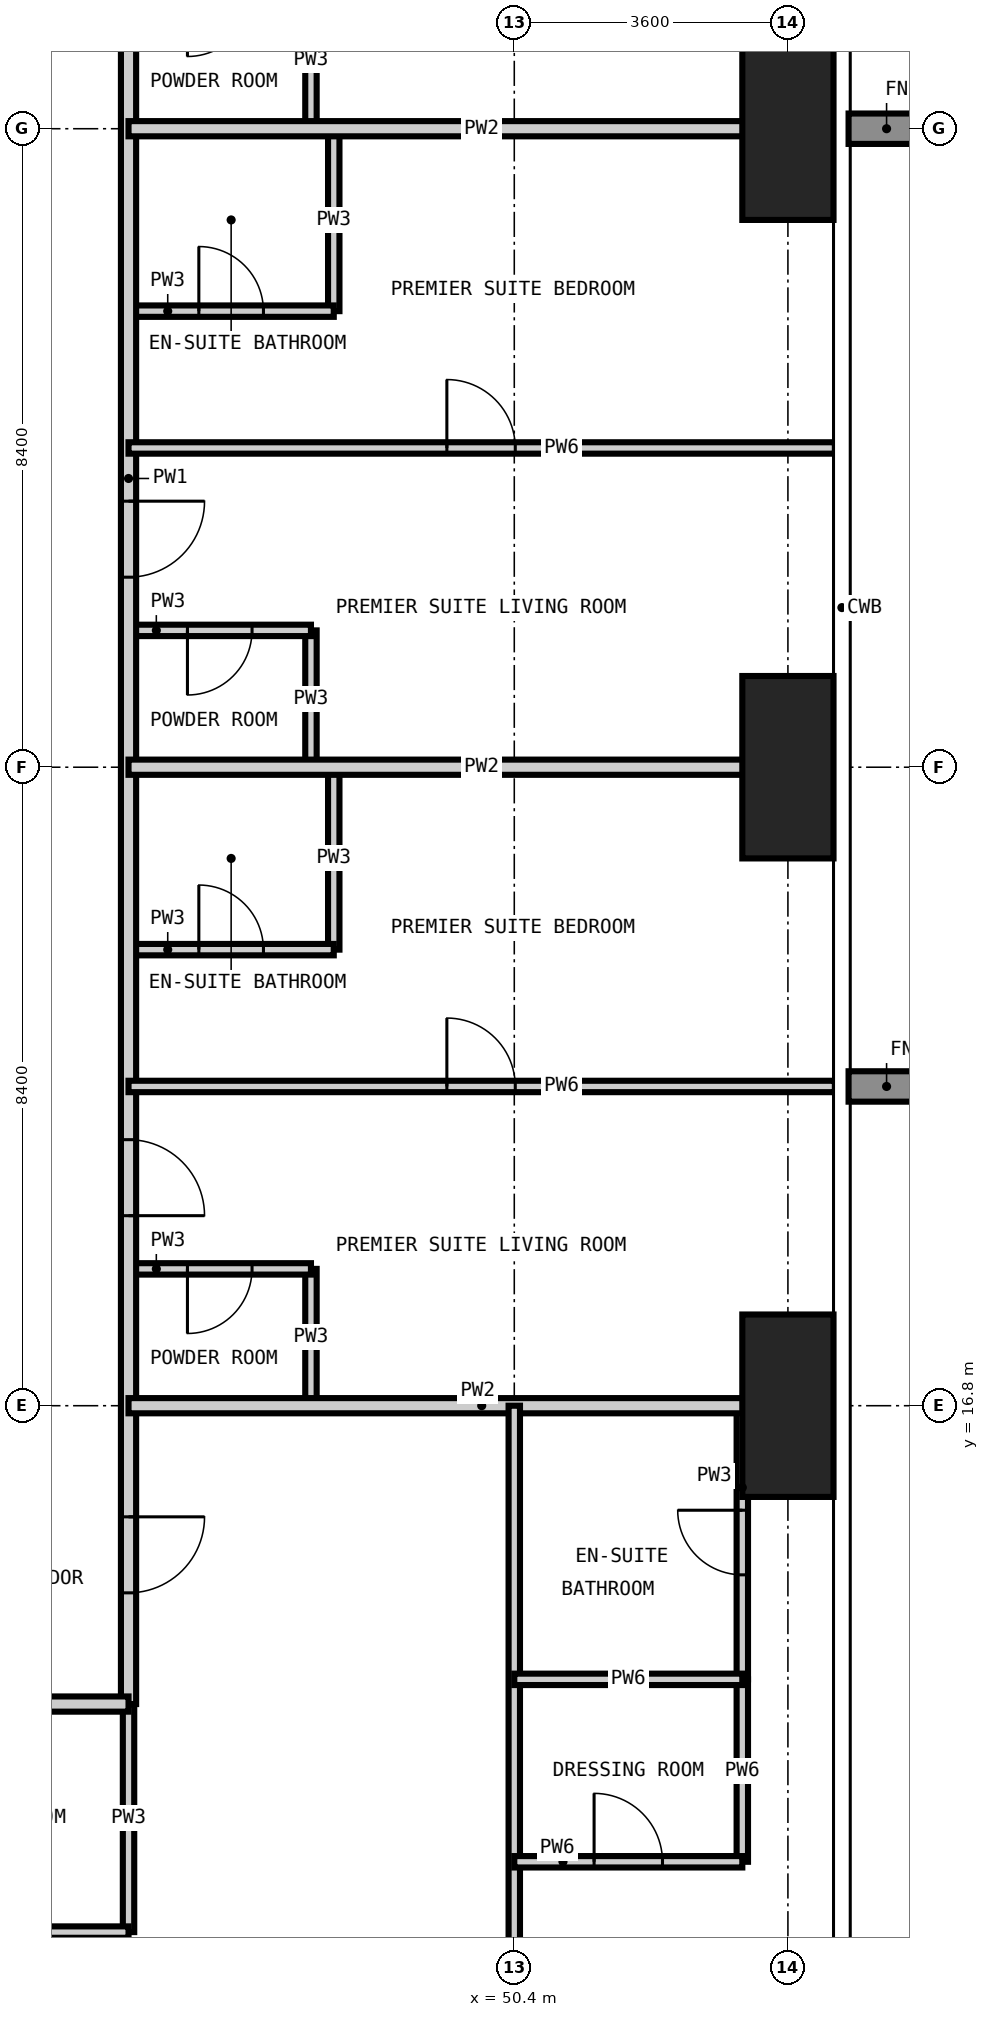
"""IFC4 building model, lengths in metres.
Left out: names, types, materials, properties, quantities, classifications, styles, units other than length and angle.
Written with IfcOpenShell. Run it as: python <this file> out.ifc"""

import sys

from ifc_helpers import new_model, si_unit, direction, frame, frame_2d, origin, origin_2d, place, context, subcontext, project, spatial, rectangle, extrude, element, fill, save


model = new_model("IFC4")
c1 = context("Model", 3, precision=1e-05, world=origin(), true_north=direction((0.0, 1.0)))
c2 = subcontext(c1, "Body", "Model", "MODEL_VIEW")
j1 = project(units=[si_unit("LENGTHUNIT", "METRE"), si_unit("PLANEANGLEUNIT", "RADIAN")], contexts=[c1])
p1 = place(None, origin())
s1 = spatial("IfcSite", under=j1, at=p1, CompositionType="ELEMENT")
p2 = place(p1, origin())
s2 = spatial("IfcBuilding", under=s1, at=p2, CompositionType="ELEMENT")
p3 = place(p2, frame((0.0, 0.0, 111.6)))
s3 = spatial("IfcBuildingStorey", under=s2, at=p3, CompositionType="ELEMENT", Elevation=111.6)
for number, where, z_axis, x_axis in (
    (1, (54.0, 16.8, -0.35), (0.0, 0.0, 1.0), (1.0, 0.0, 0.0)),
    (2, (54.0, 25.2, -0.35), (0.0, 0.0, 1.0), (1.0, 0.0, 0.0)),
    (3, (54.0, 33.6, -0.35), (0.0, 0.0, 1.0), (1.0, 0.0, 0.0)),
):
    element("IfcColumn", number, at=place(p3, frame(where, z_axis=z_axis, x_axis=x_axis)), inside=s3, PredefinedType="COLUMN", context=c2, shape_type="SweptSolid", body=[
        extrude(rectangle(XDim=1.2, YDim=2.4, at=origin_2d()), origin(), (0.0, 0.0, 1.0), 3.6),
    ])
p4 = place(p3, frame((45.325, 9.875, 0.0), z_axis=(0.0, 0.0, 1.0), x_axis=(0.0, 1.0, 0.0)))
e4 = element("IfcWall", 4, at=p4, inside=s3, PredefinedType="PARTITIONING", context=c2, shape_type="SweptSolid", body=[
    extrude(rectangle(XDim=3.0, YDim=0.15, at=frame_2d((1.5, 0.0))), origin(), (0.0, 0.0, 1.0), 3.25),
])
for number, where, z_axis, x_axis in (
    (5, (47.725, 16.8, 0.0), (0.0, 0.0, 1.0), (0.0, 1.0, 0.0)),
    (6, (47.725, 25.2, 0.0), (0.0, 0.0, 1.0), (0.0, 1.0, 0.0)),
):
    element("IfcWall", number, at=place(p3, frame(where, z_axis=z_axis, x_axis=x_axis)), inside=s3, PredefinedType="PARTITIONING", context=c2, shape_type="SweptSolid", body=[
        extrude(rectangle(XDim=1.8, YDim=0.15, at=frame_2d((0.9, 0.0))), origin(), (0.0, 0.0, 1.0), 3.25),
    ])
p5 = place(p3, frame((47.725, 33.6, 0.0), z_axis=(0.0, 0.0, 1.0), x_axis=(0.0, 1.0, 0.0)))
e7 = element("IfcWall", 7, at=p5, inside=s3, PredefinedType="PARTITIONING", context=c2, shape_type="SweptSolid", body=[
    extrude(rectangle(XDim=1.8, YDim=0.15, at=frame_2d((0.9, 0.0))), origin(), (0.0, 0.0, 1.0), 3.25),
])
p6 = place(p3, frame((48.025, 22.8, 0.0), z_axis=(0.0, 0.0, 1.0), x_axis=(0.0, 1.0, 0.0)))
e8 = element("IfcWall", 8, at=p6, inside=s3, PredefinedType="PARTITIONING", context=c2, shape_type="SweptSolid", body=[
    extrude(rectangle(XDim=2.4, YDim=0.15, at=frame_2d((1.2, 0.0))), origin(), (0.0, 0.0, 1.0), 3.25),
])
p7 = place(p3, frame((48.025, 31.2, 0.0), z_axis=(0.0, 0.0, 1.0), x_axis=(0.0, 1.0, 0.0)))
e9 = element("IfcWall", 9, at=p7, inside=s3, PredefinedType="PARTITIONING", context=c2, shape_type="SweptSolid", body=[
    extrude(rectangle(XDim=2.4, YDim=0.15, at=frame_2d((1.2, 0.0))), origin(), (0.0, 0.0, 1.0), 3.25),
])
p8 = place(p3, frame((53.4, 13.2, 0.0), z_axis=(0.0, 0.0, 1.0), x_axis=(0.0, 1.0, 0.0)))
e10 = element("IfcWall", 10, at=p8, inside=s3, PredefinedType="PARTITIONING", context=c2, shape_type="SweptSolid", body=[
    extrude(rectangle(XDim=3.6, YDim=0.15, at=frame_2d((1.8, 0.0))), origin(), (0.0, 0.0, 1.0), 3.25),
])
p9 = place(p8, frame((1.375, 0.0, 0.0)))
e11 = element("IfcOpeningElement", 11, at=p9, cuts=e10, PredefinedType="OPENING", context=c2, shape_type="SweptSolid", body=[
    extrude(rectangle(XDim=0.85, YDim=2.1, at=frame_2d((0.425, 1.05))), frame((0.0, 0.085, 0.0), z_axis=(0.0, -1.0, 0.0), x_axis=(1.0, 0.0, 0.0)), (0.0, 0.0, 1.0), 0.17),
])
p10 = place(p3, frame((42.0, 9.875, 0.0), z_axis=(0.0, 0.0, 1.0), x_axis=(1.0, 0.0, 0.0)))
e12 = element("IfcWall", 12, at=p10, inside=s3, PredefinedType="PARTITIONING", context=c2, shape_type="SweptSolid", body=[
    extrude(rectangle(XDim=3.325, YDim=0.15, at=frame_2d((1.663, 0.0))), origin(), (0.0, 0.0, 1.0), 3.25),
])
p11 = place(p10, frame((1.238, 0.0, 0.0)))
e13 = element("IfcOpeningElement", 13, at=p11, cuts=e12, PredefinedType="OPENING", context=c2, shape_type="SweptSolid", body=[
    extrude(rectangle(XDim=0.85, YDim=2.1, at=frame_2d((0.425, 1.05))), frame((0.0, 0.085, 0.0), z_axis=(0.0, -1.0, 0.0), x_axis=(1.0, 0.0, 0.0)), (0.0, 0.0, 1.0), 0.17),
])
p12 = place(p3, frame((45.325, 18.6, 0.0), z_axis=(0.0, 0.0, 1.0), x_axis=(1.0, 0.0, 0.0)))
e14 = element("IfcWall", 14, at=p12, inside=s3, PredefinedType="PARTITIONING", context=c2, shape_type="SweptSolid", body=[
    extrude(rectangle(XDim=2.4, YDim=0.15, at=frame_2d((1.2, 0.0))), origin(), (0.0, 0.0, 1.0), 3.25),
])
p13 = place(p12, frame((0.775, 0.0, 0.0)))
e15 = element("IfcOpeningElement", 15, at=p13, cuts=e14, PredefinedType="OPENING", context=c2, shape_type="SweptSolid", body=[
    extrude(rectangle(XDim=0.85, YDim=2.1, at=frame_2d((0.425, 1.05))), frame((0.0, 0.085, 0.0), z_axis=(0.0, -1.0, 0.0), x_axis=(1.0, 0.0, 0.0)), (0.0, 0.0, 1.0), 0.17),
])
p14 = place(p3, frame((45.325, 22.8, 0.0), z_axis=(0.0, 0.0, 1.0), x_axis=(1.0, 0.0, 0.0)))
e16 = element("IfcWall", 16, at=p14, inside=s3, PredefinedType="PARTITIONING", context=c2, shape_type="SweptSolid", body=[
    extrude(rectangle(XDim=2.7, YDim=0.15, at=frame_2d((1.35, 0.0))), origin(), (0.0, 0.0, 1.0), 3.25),
])
p15 = place(p14, frame((0.925, 0.0, 0.0)))
e17 = element("IfcOpeningElement", 17, at=p15, cuts=e16, PredefinedType="OPENING", context=c2, shape_type="SweptSolid", body=[
    extrude(rectangle(XDim=0.85, YDim=2.1, at=frame_2d((0.425, 1.05))), frame((0.0, 0.085, 0.0), z_axis=(0.0, -1.0, 0.0), x_axis=(1.0, 0.0, 0.0)), (0.0, 0.0, 1.0), 0.17),
])
p16 = place(p3, frame((45.325, 27.0, 0.0), z_axis=(0.0, 0.0, 1.0), x_axis=(1.0, 0.0, 0.0)))
e18 = element("IfcWall", 18, at=p16, inside=s3, PredefinedType="PARTITIONING", context=c2, shape_type="SweptSolid", body=[
    extrude(rectangle(XDim=2.4, YDim=0.15, at=frame_2d((1.2, 0.0))), origin(), (0.0, 0.0, 1.0), 3.25),
])
p17 = place(p16, frame((0.775, 0.0, 0.0)))
e19 = element("IfcOpeningElement", 19, at=p17, cuts=e18, PredefinedType="OPENING", context=c2, shape_type="SweptSolid", body=[
    extrude(rectangle(XDim=0.85, YDim=2.1, at=frame_2d((0.425, 1.05))), frame((0.0, 0.085, 0.0), z_axis=(0.0, -1.0, 0.0), x_axis=(1.0, 0.0, 0.0)), (0.0, 0.0, 1.0), 0.17),
])
p18 = place(p3, frame((45.325, 31.2, 0.0), z_axis=(0.0, 0.0, 1.0), x_axis=(1.0, 0.0, 0.0)))
e20 = element("IfcWall", 20, at=p18, inside=s3, PredefinedType="PARTITIONING", context=c2, shape_type="SweptSolid", body=[
    extrude(rectangle(XDim=2.7, YDim=0.15, at=frame_2d((1.35, 0.0))), origin(), (0.0, 0.0, 1.0), 3.25),
])
p19 = place(p18, frame((0.925, 0.0, 0.0)))
e21 = element("IfcOpeningElement", 21, at=p19, cuts=e20, PredefinedType="OPENING", context=c2, shape_type="SweptSolid", body=[
    extrude(rectangle(XDim=0.85, YDim=2.1, at=frame_2d((0.425, 1.05))), frame((0.0, 0.085, 0.0), z_axis=(0.0, -1.0, 0.0), x_axis=(1.0, 0.0, 0.0)), (0.0, 0.0, 1.0), 0.17),
])
p20 = place(p3, frame((45.325, 44.725, 0.0), z_axis=(0.0, 0.0, 1.0), x_axis=(0.0, -1.0, 0.0)))
e22 = element("IfcWall", 22, at=p20, inside=s3, PredefinedType="PARTITIONING", context=c2, shape_type="SweptSolid", body=[
    extrude(rectangle(XDim=31.85, YDim=0.2, at=frame_2d((15.925, 0.0))), origin(), (0.0, 0.0, 1.0), 3.25),
])
p21 = place(p20, frame((24.425, 0.0, 0.0)))
e23 = element("IfcOpeningElement", 23, at=p21, cuts=e22, PredefinedType="OPENING", context=c2, shape_type="SweptSolid", body=[
    extrude(rectangle(XDim=1.0, YDim=2.2, at=frame_2d((0.5, 1.1))), frame((0.0, 0.11, 0.0), z_axis=(0.0, -1.0, 0.0), x_axis=(1.0, 0.0, 0.0)), (0.0, 0.0, 1.0), 0.22),
])
p22 = place(p20, frame((16.025, 0.0, 0.0)))
e24 = element("IfcOpeningElement", 24, at=p22, cuts=e22, PredefinedType="OPENING", context=c2, shape_type="SweptSolid", body=[
    extrude(rectangle(XDim=1.0, YDim=2.2, at=frame_2d((0.5, 1.1))), frame((0.0, 0.11, 0.0), z_axis=(0.0, -1.0, 0.0), x_axis=(1.0, 0.0, 0.0)), (0.0, 0.0, 1.0), 0.22),
])
p23 = place(p20, frame((7.625, 0.0, 0.0)))
e25 = element("IfcOpeningElement", 25, at=p23, cuts=e22, PredefinedType="OPENING", context=c2, shape_type="SweptSolid", body=[
    extrude(rectangle(XDim=1.0, YDim=2.2, at=frame_2d((0.5, 1.1))), frame((0.0, 0.11, 0.0), z_axis=(0.0, -1.0, 0.0), x_axis=(1.0, 0.0, 0.0)), (0.0, 0.0, 1.0), 0.22),
])
p24 = place(p20, frame((29.387, 0.0, 0.0)))
e26 = element("IfcOpeningElement", 26, at=p24, cuts=e22, PredefinedType="OPENING", context=c2, shape_type="SweptSolid", body=[
    extrude(rectangle(XDim=1.0, YDim=2.2, at=frame_2d((0.5, 1.1))), frame((0.0, 0.11, 0.0), z_axis=(0.0, -1.0, 0.0), x_axis=(1.0, 0.0, 0.0)), (0.0, 0.0, 1.0), 0.22),
])
p25 = place(p20, frame((0.863, 0.0, 0.0)))
e27 = element("IfcOpeningElement", 27, at=p25, cuts=e22, PredefinedType="OPENING", context=c2, shape_type="SweptSolid", body=[
    extrude(rectangle(XDim=1.0, YDim=2.2, at=frame_2d((0.5, 1.1))), frame((0.0, 0.11, 0.0), z_axis=(0.0, -1.0, 0.0), x_axis=(1.0, 0.0, 0.0)), (0.0, 0.0, 1.0), 0.22),
])
p26 = place(p3, frame((45.325, 12.875, 0.0), z_axis=(0.0, 0.0, 1.0), x_axis=(-1.0, 0.0, 0.0)))
e28 = element("IfcWall", 28, at=p26, inside=s3, PredefinedType="PARTITIONING", context=c2, shape_type="SweptSolid", body=[
    extrude(rectangle(XDim=32.725, YDim=0.2, at=frame_2d((16.362, 0.0))), origin(), (0.0, 0.0, 1.0), 3.25),
])
p27 = place(p26, frame((22.625, 0.0, 0.0)))
e29 = element("IfcOpeningElement", 29, at=p27, cuts=e28, PredefinedType="OPENING", context=c2, shape_type="SweptSolid", body=[
    extrude(rectangle(XDim=1.0, YDim=2.2, at=frame_2d((0.5, 1.1))), frame((0.0, 0.11, 0.0), z_axis=(0.0, -1.0, 0.0), x_axis=(1.0, 0.0, 0.0)), (0.0, 0.0, 1.0), 0.22),
])
p28 = place(p26, frame((14.225, 0.0, 0.0)))
e30 = element("IfcOpeningElement", 30, at=p28, cuts=e28, PredefinedType="OPENING", context=c2, shape_type="SweptSolid", body=[
    extrude(rectangle(XDim=1.0, YDim=2.2, at=frame_2d((0.5, 1.1))), frame((0.0, 0.11, 0.0), z_axis=(0.0, -1.0, 0.0), x_axis=(1.0, 0.0, 0.0)), (0.0, 0.0, 1.0), 0.22),
])
p29 = place(p26, frame((5.825, 0.0, 0.0)))
e31 = element("IfcOpeningElement", 31, at=p29, cuts=e28, PredefinedType="OPENING", context=c2, shape_type="SweptSolid", body=[
    extrude(rectangle(XDim=1.0, YDim=2.2, at=frame_2d((0.5, 1.1))), frame((0.0, 0.11, 0.0), z_axis=(0.0, -1.0, 0.0), x_axis=(1.0, 0.0, 0.0)), (0.0, 0.0, 1.0), 0.22),
])
for number, where, z_axis, x_axis in (
    (32, (45.325, 16.8, 0.0), (0.0, 0.0, 1.0), (1.0, 0.0, 0.0)),
    (33, (45.325, 25.2, 0.0), (0.0, 0.0, 1.0), (1.0, 0.0, 0.0)),
    (34, (45.325, 33.6, 0.0), (0.0, 0.0, 1.0), (1.0, 0.0, 0.0)),
):
    element("IfcWall", number, at=place(p3, frame(where, z_axis=z_axis, x_axis=x_axis)), inside=s3, PredefinedType="PARTITIONING", context=c2, shape_type="SweptSolid", body=[
        extrude(rectangle(XDim=9.293, YDim=0.2, at=frame_2d((4.646, 0.0))), origin(), (0.0, 0.0, 1.0), 3.25),
    ])
p30 = place(p3, frame((50.4, -0.018, 0.0), z_axis=(0.0, 0.0, 1.0), x_axis=(0.0, 1.0, 0.0)))
e35 = element("IfcWall", 35, at=p30, inside=s3, PredefinedType="PARTITIONING", context=c2, shape_type="SweptSolid", body=[
    extrude(rectangle(XDim=16.818, YDim=0.15, at=frame_2d((8.409, 0.0))), origin(), (0.0, 0.0, 1.0), 3.25),
])
p31 = place(p30, frame((5.668, 0.0, 0.0)))
e36 = element("IfcOpeningElement", 36, at=p31, cuts=e35, PredefinedType="OPENING", context=c2, shape_type="SweptSolid", body=[
    extrude(rectangle(XDim=0.9, YDim=2.1, at=frame_2d((0.45, 1.05))), frame((0.0, 0.085, 0.0), z_axis=(0.0, -1.0, 0.0), x_axis=(1.0, 0.0, 0.0)), (0.0, 0.0, 1.0), 0.17),
])
p32 = place(p3, frame((53.4, 10.8, 0.0), z_axis=(0.0, 0.0, 1.0), x_axis=(0.0, 1.0, 0.0)))
e37 = element("IfcWall", 37, at=p32, inside=s3, PredefinedType="PARTITIONING", context=c2, shape_type="SweptSolid", body=[
    extrude(rectangle(XDim=2.4, YDim=0.15, at=frame_2d((1.2, 0.0))), origin(), (0.0, 0.0, 1.0), 3.25),
])
p33 = place(p3, frame((50.4, 10.8, 0.0), z_axis=(0.0, 0.0, 1.0), x_axis=(1.0, 0.0, 0.0)))
e38 = element("IfcWall", 38, at=p33, inside=s3, PredefinedType="PARTITIONING", context=c2, shape_type="SweptSolid", body=[
    extrude(rectangle(XDim=3.0, YDim=0.15, at=frame_2d((1.5, 0.0))), origin(), (0.0, 0.0, 1.0), 3.25),
])
p34 = place(p33, frame((1.05, 0.0, 0.0)))
e39 = element("IfcOpeningElement", 39, at=p34, cuts=e38, PredefinedType="OPENING", context=c2, shape_type="SweptSolid", body=[
    extrude(rectangle(XDim=0.9, YDim=2.1, at=frame_2d((0.45, 1.05))), frame((0.0, 0.085, 0.0), z_axis=(0.0, -1.0, 0.0), x_axis=(1.0, 0.0, 0.0)), (0.0, 0.0, 1.0), 0.17),
])
p35 = place(p3, frame((50.4, 13.2, 0.0), z_axis=(0.0, 0.0, 1.0), x_axis=(1.0, 0.0, 0.0)))
e40 = element("IfcWall", 40, at=p35, inside=s3, PredefinedType="PARTITIONING", context=c2, shape_type="SweptSolid", body=[
    extrude(rectangle(XDim=3.0, YDim=0.15, at=frame_2d((1.5, 0.0))), origin(), (0.0, 0.0, 1.0), 3.25),
])
p36 = place(p3, frame((45.325, 21.0, 0.0), z_axis=(0.0, 0.0, 1.0), x_axis=(1.0, 0.0, 0.0)))
e41 = element("IfcWall", 41, at=p36, inside=s3, PredefinedType="PARTITIONING", context=c2, shape_type="SweptSolid", body=[
    extrude(rectangle(XDim=9.293, YDim=0.15, at=frame_2d((4.646, 0.0))), origin(), (0.0, 0.0, 1.0), 3.25),
])
p37 = place(p36, frame((4.188, 0.0, 0.0)))
e42 = element("IfcOpeningElement", 42, at=p37, cuts=e41, PredefinedType="OPENING", context=c2, shape_type="SweptSolid", body=[
    extrude(rectangle(XDim=0.9, YDim=2.1, at=frame_2d((0.45, 1.05))), frame((0.0, 0.085, 0.0), z_axis=(0.0, -1.0, 0.0), x_axis=(1.0, 0.0, 0.0)), (0.0, 0.0, 1.0), 0.17),
])
p38 = place(p3, frame((45.325, 29.4, 0.0), z_axis=(0.0, 0.0, 1.0), x_axis=(1.0, 0.0, 0.0)))
e43 = element("IfcWall", 43, at=p38, inside=s3, PredefinedType="PARTITIONING", context=c2, shape_type="SweptSolid", body=[
    extrude(rectangle(XDim=9.293, YDim=0.15, at=frame_2d((4.646, 0.0))), origin(), (0.0, 0.0, 1.0), 3.25),
])
p39 = place(p38, frame((4.188, 0.0, 0.0)))
e44 = element("IfcOpeningElement", 44, at=p39, cuts=e43, PredefinedType="OPENING", context=c2, shape_type="SweptSolid", body=[
    extrude(rectangle(XDim=0.9, YDim=2.1, at=frame_2d((0.45, 1.05))), frame((0.0, 0.085, 0.0), z_axis=(0.0, -1.0, 0.0), x_axis=(1.0, 0.0, 0.0)), (0.0, 0.0, 1.0), 0.17),
])
p40 = place(p21, origin())
e45 = element("IfcDoor", 45, at=p40, inside=s3, OperationType="SINGLE_SWING_RIGHT", PredefinedType="DOOR", context=c2, shape_type="SweptSolid", body=[
    extrude(rectangle(XDim=1.0, YDim=2.2, at=frame_2d((0.5, 1.1))), frame((0.0, 0.025, 0.0), z_axis=(0.0, -1.0, 0.0), x_axis=(1.0, 0.0, 0.0)), (0.0, 0.0, 1.0), 0.05),
])
fill(e23, e45)
p41 = place(p13, frame((0.85, 0.0, 0.0), z_axis=(0.0, 0.0, 1.0), x_axis=(-1.0, 0.0, 0.0)))
e46 = element("IfcDoor", 46, at=p41, inside=s3, OperationType="SINGLE_SWING_RIGHT", PredefinedType="DOOR", context=c2, shape_type="SweptSolid", body=[
    extrude(rectangle(XDim=0.85, YDim=2.1, at=frame_2d((0.425, 1.05))), frame((0.0, 0.025, 0.0), z_axis=(0.0, -1.0, 0.0), x_axis=(1.0, 0.0, 0.0)), (0.0, 0.0, 1.0), 0.05),
])
fill(e15, e46)
p42 = place(p37, origin())
e47 = element("IfcDoor", 47, at=p42, inside=s3, OperationType="SINGLE_SWING_LEFT", PredefinedType="DOOR", context=c2, shape_type="SweptSolid", body=[
    extrude(rectangle(XDim=0.9, YDim=2.1, at=frame_2d((0.45, 1.05))), frame((0.0, 0.025, 0.0), z_axis=(0.0, -1.0, 0.0), x_axis=(1.0, 0.0, 0.0)), (0.0, 0.0, 1.0), 0.05),
])
fill(e42, e47)
p43 = place(p15, origin())
e48 = element("IfcDoor", 48, at=p43, inside=s3, OperationType="SINGLE_SWING_LEFT", PredefinedType="DOOR", context=c2, shape_type="SweptSolid", body=[
    extrude(rectangle(XDim=0.85, YDim=2.1, at=frame_2d((0.425, 1.05))), frame((0.0, 0.025, 0.0), z_axis=(0.0, -1.0, 0.0), x_axis=(1.0, 0.0, 0.0)), (0.0, 0.0, 1.0), 0.05),
])
fill(e17, e48)
p44 = place(p22, origin())
e49 = element("IfcDoor", 49, at=p44, inside=s3, OperationType="SINGLE_SWING_LEFT", PredefinedType="DOOR", context=c2, shape_type="SweptSolid", body=[
    extrude(rectangle(XDim=1.0, YDim=2.2, at=frame_2d((0.5, 1.1))), frame((0.0, 0.025, 0.0), z_axis=(0.0, -1.0, 0.0), x_axis=(1.0, 0.0, 0.0)), (0.0, 0.0, 1.0), 0.05),
])
fill(e24, e49)
p45 = place(p17, frame((0.85, 0.0, 0.0), z_axis=(0.0, 0.0, 1.0), x_axis=(-1.0, 0.0, 0.0)))
e50 = element("IfcDoor", 50, at=p45, inside=s3, OperationType="SINGLE_SWING_RIGHT", PredefinedType="DOOR", context=c2, shape_type="SweptSolid", body=[
    extrude(rectangle(XDim=0.85, YDim=2.1, at=frame_2d((0.425, 1.05))), frame((0.0, 0.025, 0.0), z_axis=(0.0, -1.0, 0.0), x_axis=(1.0, 0.0, 0.0)), (0.0, 0.0, 1.0), 0.05),
])
fill(e19, e50)
p46 = place(p39, origin())
e51 = element("IfcDoor", 51, at=p46, inside=s3, OperationType="SINGLE_SWING_LEFT", PredefinedType="DOOR", context=c2, shape_type="SweptSolid", body=[
    extrude(rectangle(XDim=0.9, YDim=2.1, at=frame_2d((0.45, 1.05))), frame((0.0, 0.025, 0.0), z_axis=(0.0, -1.0, 0.0), x_axis=(1.0, 0.0, 0.0)), (0.0, 0.0, 1.0), 0.05),
])
fill(e44, e51)
p47 = place(p19, origin())
e52 = element("IfcDoor", 52, at=p47, inside=s3, OperationType="SINGLE_SWING_LEFT", PredefinedType="DOOR", context=c2, shape_type="SweptSolid", body=[
    extrude(rectangle(XDim=0.85, YDim=2.1, at=frame_2d((0.425, 1.05))), frame((0.0, 0.025, 0.0), z_axis=(0.0, -1.0, 0.0), x_axis=(1.0, 0.0, 0.0)), (0.0, 0.0, 1.0), 0.05),
])
fill(e21, e52)
p48 = place(p24, origin())
e53 = element("IfcDoor", 53, at=p48, inside=s3, OperationType="SINGLE_SWING_LEFT", PredefinedType="DOOR", context=c2, shape_type="SweptSolid", body=[
    extrude(rectangle(XDim=1.0, YDim=2.2, at=frame_2d((0.5, 1.1))), frame((0.0, 0.025, 0.0), z_axis=(0.0, -1.0, 0.0), x_axis=(1.0, 0.0, 0.0)), (0.0, 0.0, 1.0), 0.05),
])
fill(e26, e53)
p49 = place(p9, origin())
e54 = element("IfcDoor", 54, at=p49, inside=s3, OperationType="SINGLE_SWING_RIGHT", PredefinedType="DOOR", context=c2, shape_type="SweptSolid", body=[
    extrude(rectangle(XDim=0.85, YDim=2.1, at=frame_2d((0.425, 1.05))), frame((0.0, 0.025, 0.0), z_axis=(0.0, -1.0, 0.0), x_axis=(1.0, 0.0, 0.0)), (0.0, 0.0, 1.0), 0.05),
])
fill(e11, e54)
p50 = place(p34, origin())
e55 = element("IfcDoor", 55, at=p50, inside=s3, OperationType="SINGLE_SWING_LEFT", PredefinedType="DOOR", context=c2, shape_type="SweptSolid", body=[
    extrude(rectangle(XDim=0.9, YDim=2.1, at=frame_2d((0.45, 1.05))), frame((0.0, 0.025, 0.0), z_axis=(0.0, -1.0, 0.0), x_axis=(1.0, 0.0, 0.0)), (0.0, 0.0, 1.0), 0.05),
])
fill(e39, e55)
save(model, sys.argv[1])
